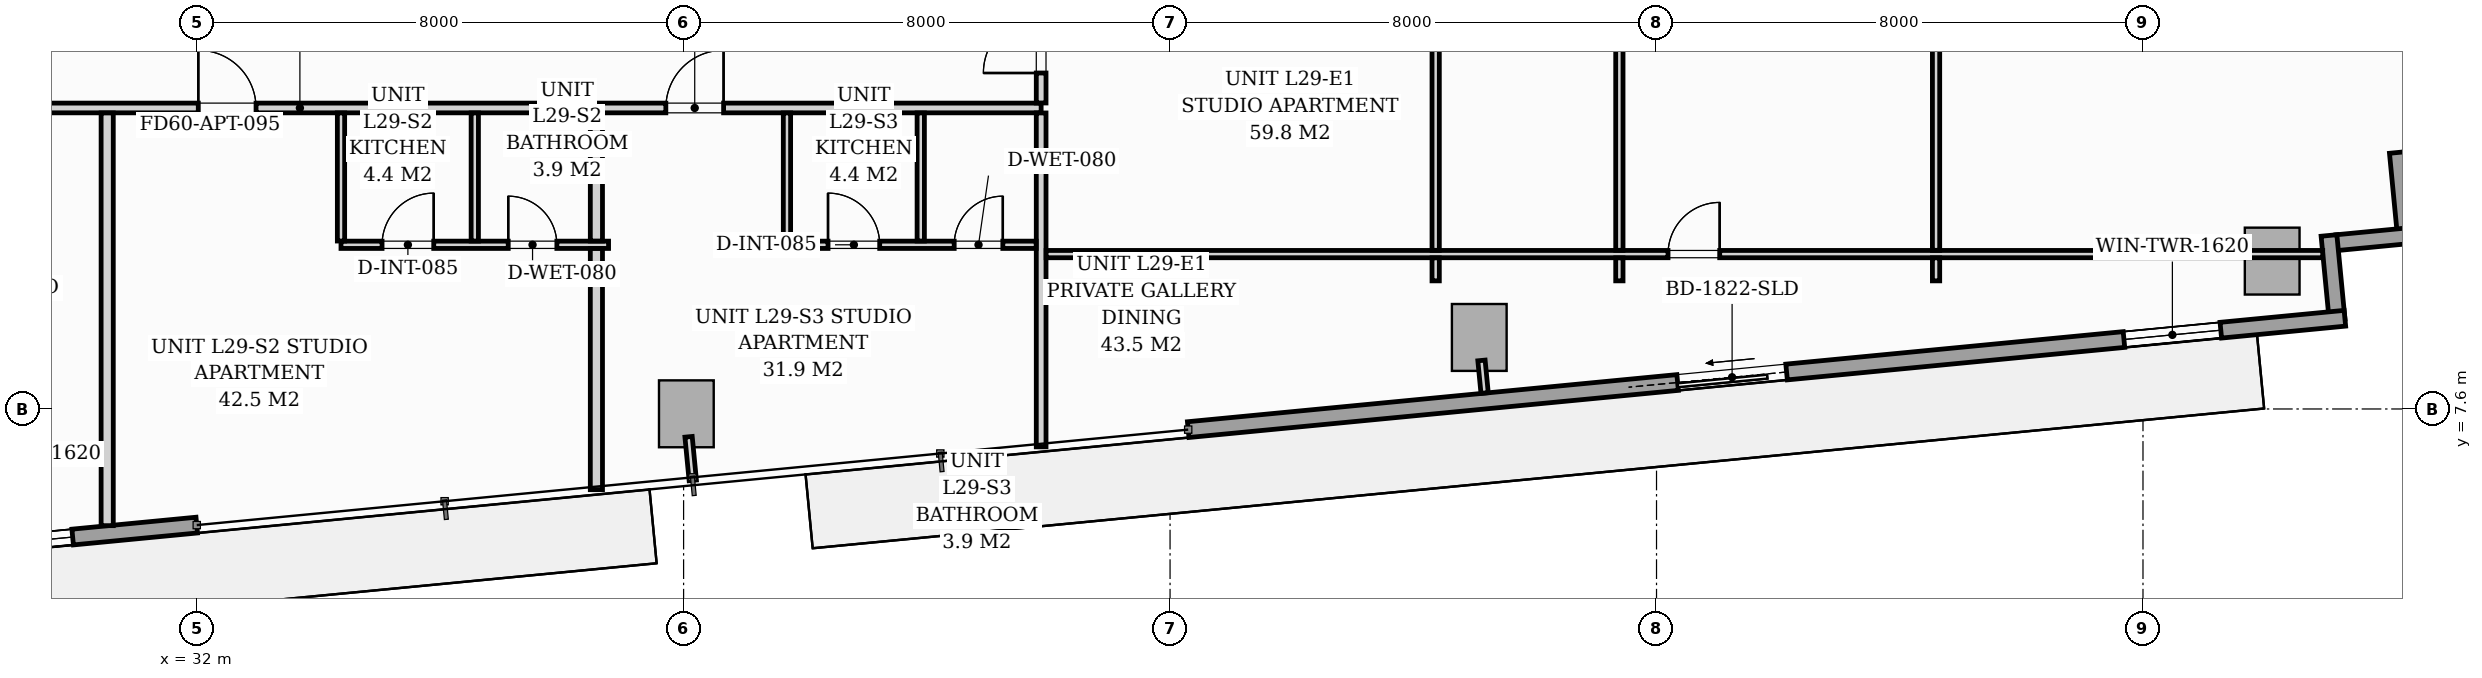
"""IFC4 building model, lengths in metres.
Left out: names, types, materials, properties, quantities, classifications, styles, units other than length and angle.
Written with IfcOpenShell. Run it as: python <this file> out.ifc"""

import sys

from ifc_helpers import new_model, si_unit, direction, frame, frame_2d, origin, origin_2d, place, context, subcontext, project, spatial, rectangle, extrude, source, transform, mapped, element, fill, save


model = new_model("IFC4")
c1 = context("Model", 3, precision=1e-05, world=origin(), true_north=direction((0.0, 1.0)))
c2 = subcontext(c1, "Body", "Model", "MODEL_VIEW")
j1 = project(units=[si_unit("LENGTHUNIT", "METRE"), si_unit("PLANEANGLEUNIT", "RADIAN")], contexts=[c1])
p1 = place(None, origin())
s1 = spatial("IfcSite", under=j1, at=p1, CompositionType="ELEMENT")
p2 = place(p1, origin())
s2 = spatial("IfcBuilding", under=s1, at=p2, CompositionType="ELEMENT")
p3 = place(p2, frame((0.0, 0.0, 103.4)))
s3 = spatial("IfcBuildingStorey", under=s2, at=p3, CompositionType="ELEMENT", Elevation=103.4)
m1 = source(origin(), c2, "Body", "SweptSolid", [
    extrude(rectangle(XDim=0.9, YDim=1.1, at=origin_2d()), origin(), (0.0, 0.0, 1.0), 3.196),
])
for number, where, z_axis, x_axis in (
    (1, (40.045, 7.521, 0.002), (0.0, 0.0, 1.0), (0.995, 0.096, 0.0)),
    (2, (53.085, 8.776, 0.002), (0.0, 0.0, 1.0), (0.995, 0.096, 0.0)),
    (3, (66.125, 10.032, 0.002), (0.0, 0.0, 1.0), (0.995, 0.096, 0.0)),
):
    element("IfcColumn", number, at=place(p3, frame(where, z_axis=z_axis, x_axis=x_axis)), inside=s3, PredefinedType="COLUMN", context=c2, shape_type="MappedRepresentation", body=[
        mapped(m1, transform((0.0, 0.0, 0.0), scale=1.0)),
    ])
p4 = place(p3, frame((68.183, 11.817, 0.0), z_axis=(0.0, 0.0, 1.0), x_axis=(0.095915846097, -0.995389446633, 0.0)))
e4 = element("IfcWall", 4, at=p4, inside=s3, PredefinedType="STANDARD", context=c2, shape_type="SweptSolid", body=[
    extrude(rectangle(XDim=1.395, YDim=0.26, at=frame_2d((0.697, 0.0))), origin(), (0.0, 0.0, 1.0), 2.94),
])
p5 = place(p3, frame((68.574, 10.469, 0.0), z_axis=(0.0, 0.0, 1.0), x_axis=(-0.99540774648, -0.095725744959, 0.0)))
e5 = element("IfcWall", 5, at=p5, inside=s3, PredefinedType="STANDARD", context=c2, shape_type="SweptSolid", body=[
    extrude(rectangle(XDim=1.395, YDim=0.26, at=frame_2d((0.698, 0.0))), origin(), (0.0, 0.0, 1.0), 2.94),
])
p6 = place(p3, frame((67.059, 10.453, 0.0), z_axis=(0.0, 0.0, 1.0), x_axis=(0.095915846097, -0.995389446633, 0.0)))
e6 = element("IfcWall", 6, at=p6, inside=s3, PredefinedType="STANDARD", context=c2, shape_type="SweptSolid", body=[
    extrude(rectangle(XDim=1.395, YDim=0.26, at=frame_2d((0.697, 0.0))), origin(), (0.0, 0.0, 1.0), 2.94),
])
p7 = place(p3, frame((67.32, 9.092, 0.0), z_axis=(0.0, 0.0, 1.0), x_axis=(-0.995396521236, -0.095842399342, 0.0)))
e7 = element("IfcWall", 7, at=p7, inside=s3, PredefinedType="STANDARD", context=c2, shape_type="SweptSolid", body=[
    extrude(rectangle(XDim=19.11, YDim=0.26, at=frame_2d((9.555, 0.0))), origin(), (0.0, 0.0, 1.0), 2.94),
])
p8 = place(p7, frame((9.224, 0.0, 0.0)))
e8 = element("IfcOpeningElement", 8, at=p8, cuts=e7, PredefinedType="OPENING", context=c2, shape_type="SweptSolid", body=[
    extrude(rectangle(XDim=1.8, YDim=2.06, at=frame_2d((0.9, 1.03))), frame((0.0, 0.14, 0.0), z_axis=(0.0, -1.0, 0.0), x_axis=(1.0, 0.0, 0.0)), (0.0, 0.0, 1.0), 0.28),
])
p9 = place(p7, frame((2.05, 0.0, 0.65)))
e9 = element("IfcOpeningElement", 9, at=p9, cuts=e7, PredefinedType="OPENING", context=c2, shape_type="SweptSolid", body=[
    extrude(rectangle(XDim=1.6, YDim=1.5, at=frame_2d((0.8, 0.75))), frame((0.0, 0.14, 0.0), z_axis=(0.0, -1.0, 0.0), x_axis=(1.0, 0.0, 0.0)), (0.0, 0.0, 1.0), 0.28),
])
p10 = place(p3, frame((31.994, 5.69, 0.0), z_axis=(0.0, 0.0, 1.0), x_axis=(-0.995396521236, -0.095842399342, 0.0)))
e10 = element("IfcWall", 10, at=p10, inside=s3, PredefinedType="STANDARD", context=c2, shape_type="SweptSolid", body=[
    extrude(rectangle(XDim=19.11, YDim=0.26, at=frame_2d((9.555, 0.0))), origin(), (0.0, 0.0, 1.0), 2.94),
])
p11 = place(p10, frame((8.33, 0.0, 0.0)))
e11 = element("IfcOpeningElement", 11, at=p11, cuts=e10, PredefinedType="OPENING", context=c2, shape_type="SweptSolid", body=[
    extrude(rectangle(XDim=1.8, YDim=2.06, at=frame_2d((0.9, 1.03))), frame((0.0, 0.14, 0.0), z_axis=(0.0, -1.0, 0.0), x_axis=(1.0, 0.0, 0.0)), (0.0, 0.0, 1.0), 0.28),
])
p12 = place(p10, frame((2.05, 0.0, 0.65)))
e12 = element("IfcOpeningElement", 12, at=p12, cuts=e10, PredefinedType="OPENING", context=c2, shape_type="SweptSolid", body=[
    extrude(rectangle(XDim=1.6, YDim=1.5, at=frame_2d((0.8, 0.75))), frame((0.0, 0.14, 0.0), z_axis=(0.0, -1.0, 0.0), x_axis=(1.0, 0.0, 0.0)), (0.0, 0.0, 1.0), 0.28),
])
p13 = place(p3, frame((21.5, 12.55, 0.0), z_axis=(0.0, 0.0, 1.0), x_axis=(1.0, 0.0, 0.0)))
e13 = element("IfcWall", 13, at=p13, inside=s3, PredefinedType="PARTITIONING", context=c2, shape_type="SweptSolid", body=[
    extrude(rectangle(XDim=24.38, YDim=0.16, at=frame_2d((12.19, 0.0))), origin(), (0.0, 0.0, 1.0), 2.94),
])
p14 = place(p13, frame((6.075, 0.0, 0.0)))
e14 = element("IfcOpeningElement", 14, at=p14, cuts=e13, PredefinedType="OPENING", context=c2, shape_type="SweptSolid", body=[
    extrude(rectangle(XDim=0.95, YDim=2.06, at=frame_2d((0.475, 1.03))), frame((0.0, 0.09, 0.0), z_axis=(0.0, -1.0, 0.0), x_axis=(1.0, 0.0, 0.0)), (0.0, 0.0, 1.0), 0.18),
])
p15 = place(p13, frame((10.519, 0.0, 0.0)))
e15 = element("IfcOpeningElement", 15, at=p15, cuts=e13, PredefinedType="OPENING", context=c2, shape_type="SweptSolid", body=[
    extrude(rectangle(XDim=0.95, YDim=2.06, at=frame_2d((0.475, 1.03))), frame((0.0, 0.09, 0.0), z_axis=(0.0, -1.0, 0.0), x_axis=(1.0, 0.0, 0.0)), (0.0, 0.0, 1.0), 0.18),
])
p16 = place(p13, frame((18.208, 0.0, 0.0)))
e16 = element("IfcOpeningElement", 16, at=p16, cuts=e13, PredefinedType="OPENING", context=c2, shape_type="SweptSolid", body=[
    extrude(rectangle(XDim=0.95, YDim=2.06, at=frame_2d((0.475, 1.03))), frame((0.0, 0.09, 0.0), z_axis=(0.0, -1.0, 0.0), x_axis=(1.0, 0.0, 0.0)), (0.0, 0.0, 1.0), 0.18),
])
p17 = place(p3, frame((45.88, 6.977, 0.0), z_axis=(0.0, 0.0, 1.0), x_axis=(0.0, 1.0, 0.0)))
e17 = element("IfcWall", 17, at=p17, inside=s3, PredefinedType="PARTITIONING", context=c2, shape_type="SweptSolid", body=[
    extrude(rectangle(XDim=5.491, YDim=0.16, at=frame_2d((2.745, 0.0))), origin(), (0.0, 0.0, 1.0), 2.94),
])
p18 = place(p3, frame((45.88, 12.632, 0.0), z_axis=(0.0, 0.0, 1.0), x_axis=(0.0, 1.0, 0.0)))
e18 = element("IfcWall", 18, at=p18, inside=s3, PredefinedType="PARTITIONING", context=c2, shape_type="SweptSolid", body=[
    extrude(rectangle(XDim=4.466, YDim=0.16, at=frame_2d((2.233, 0.0))), origin(), (0.0, 0.0, 1.0), 2.94),
])
p19 = place(p18, frame((0.493, 0.0, 0.0)))
e19 = element("IfcOpeningElement", 19, at=p19, cuts=e18, PredefinedType="OPENING", context=c2, shape_type="SweptSolid", body=[
    extrude(rectangle(XDim=0.95, YDim=2.06, at=frame_2d((0.475, 1.03))), frame((0.0, 0.09, 0.0), z_axis=(0.0, -1.0, 0.0), x_axis=(1.0, 0.0, 0.0)), (0.0, 0.0, 1.0), 0.18),
])
p20 = place(p3, frame((30.521, 5.681, 0.0), z_axis=(0.0, 0.0, 1.0), x_axis=(0.0, 1.0, 0.0)))
e20 = element("IfcWall", 20, at=p20, inside=s3, PredefinedType="PARTITIONING", context=c2, shape_type="SweptSolid", body=[
    extrude(rectangle(XDim=6.787, YDim=0.2, at=frame_2d((3.394, 0.0))), origin(), (0.0, 0.0, 1.0), 2.94),
])
p21 = place(p3, frame((34.366, 10.3, 0.0), z_axis=(0.0, 0.0, 1.0), x_axis=(1.0, 0.0, 0.0)))
e21 = element("IfcWall", 21, at=p21, inside=s3, PredefinedType="PARTITIONING", context=c2, shape_type="SweptSolid", body=[
    extrude(rectangle(XDim=4.4, YDim=0.12, at=frame_2d((2.2, 0.0))), origin(), (0.0, 0.0, 1.0), 2.94),
])
p22 = place(p21, frame((0.675, 0.0, 0.0)))
e22 = element("IfcOpeningElement", 22, at=p22, cuts=e21, PredefinedType="OPENING", context=c2, shape_type="SweptSolid", body=[
    extrude(rectangle(XDim=0.85, YDim=2.05, at=frame_2d((0.425, 1.025))), frame((0.0, 0.07, 0.0), z_axis=(0.0, -1.0, 0.0), x_axis=(1.0, 0.0, 0.0)), (0.0, 0.0, 1.0), 0.14),
])
p23 = place(p21, frame((2.75, 0.0, 0.0)))
e23 = element("IfcOpeningElement", 23, at=p23, cuts=e21, PredefinedType="OPENING", context=c2, shape_type="SweptSolid", body=[
    extrude(rectangle(XDim=0.8, YDim=2.02, at=frame_2d((0.4, 1.01))), frame((0.0, 0.07, 0.0), z_axis=(0.0, -1.0, 0.0), x_axis=(1.0, 0.0, 0.0)), (0.0, 0.0, 1.0), 0.14),
])
for number, where, z_axis, x_axis in (
    (24, (34.366, 10.362, 0.0), (0.0, 0.0, 1.0), (0.0, 1.0, 0.0)),
    (25, (36.566, 10.362, 0.0), (0.0, 0.0, 1.0), (0.0, 1.0, 0.0)),
):
    element("IfcWall", number, at=place(p3, frame(where, z_axis=z_axis, x_axis=x_axis)), inside=s3, PredefinedType="PARTITIONING", context=c2, shape_type="SweptSolid", body=[
        extrude(rectangle(XDim=2.106, YDim=0.12, at=frame_2d((1.053, 0.0))), origin(), (0.0, 0.0, 1.0), 2.94),
    ])
p24 = place(p3, frame((38.566, 6.273, 0.0), z_axis=(0.0, 0.0, 1.0), x_axis=(0.0, 1.0, 0.0)))
e26 = element("IfcWall", 26, at=p24, inside=s3, PredefinedType="PARTITIONING", context=c2, shape_type="SweptSolid", body=[
    extrude(rectangle(XDim=3.965, YDim=0.2, at=frame_2d((1.982, 0.0))), origin(), (0.0, 0.0, 1.0), 2.94),
])
p25 = place(p3, frame((38.566, 10.362, 0.0), z_axis=(0.0, 0.0, 1.0), x_axis=(0.0, 1.0, 0.0)))
e27 = element("IfcWall", 27, at=p25, inside=s3, PredefinedType="PARTITIONING", context=c2, shape_type="SweptSolid", body=[
    extrude(rectangle(XDim=2.106, YDim=0.2, at=frame_2d((1.053, 0.0))), origin(), (0.0, 0.0, 1.0), 2.94),
])
p26 = place(p3, frame((41.7, 10.3, 0.0), z_axis=(0.0, 0.0, 1.0), x_axis=(1.0, 0.0, 0.0)))
e28 = element("IfcWall", 28, at=p26, inside=s3, PredefinedType="PARTITIONING", context=c2, shape_type="SweptSolid", body=[
    extrude(rectangle(XDim=4.098, YDim=0.12, at=frame_2d((2.049, 0.0))), origin(), (0.0, 0.0, 1.0), 2.94),
])
p27 = place(p26, frame((0.675, 0.0, 0.0)))
e29 = element("IfcOpeningElement", 29, at=p27, cuts=e28, PredefinedType="OPENING", context=c2, shape_type="SweptSolid", body=[
    extrude(rectangle(XDim=0.85, YDim=2.05, at=frame_2d((0.425, 1.025))), frame((0.0, 0.07, 0.0), z_axis=(0.0, -1.0, 0.0), x_axis=(1.0, 0.0, 0.0)), (0.0, 0.0, 1.0), 0.14),
])
p28 = place(p26, frame((2.75, 0.0, 0.0)))
e30 = element("IfcOpeningElement", 30, at=p28, cuts=e28, PredefinedType="OPENING", context=c2, shape_type="SweptSolid", body=[
    extrude(rectangle(XDim=0.8, YDim=2.02, at=frame_2d((0.4, 1.01))), frame((0.0, 0.07, 0.0), z_axis=(0.0, -1.0, 0.0), x_axis=(1.0, 0.0, 0.0)), (0.0, 0.0, 1.0), 0.14),
])
for number, where, z_axis, x_axis in (
    (31, (41.7, 10.362, 0.0), (0.0, 0.0, 1.0), (0.0, 1.0, 0.0)),
    (32, (43.9, 10.362, 0.0), (0.0, 0.0, 1.0), (0.0, 1.0, 0.0)),
):
    element("IfcWall", number, at=place(p3, frame(where, z_axis=z_axis, x_axis=x_axis)), inside=s3, PredefinedType="PARTITIONING", context=c2, shape_type="SweptSolid", body=[
        extrude(rectangle(XDim=2.106, YDim=0.12, at=frame_2d((1.053, 0.0))), origin(), (0.0, 0.0, 1.0), 2.94),
    ])
p29 = place(p3, frame((45.962, 10.147, 0.0), z_axis=(0.0, 0.0, 1.0), x_axis=(1.0, 0.0, 0.0)))
e33 = element("IfcWall", 33, at=p29, inside=s3, PredefinedType="PARTITIONING", context=c2, shape_type="SweptSolid", body=[
    extrude(rectangle(XDim=20.994, YDim=0.12, at=frame_2d((10.497, 0.0))), origin(), (0.0, 0.0, 1.0), 2.31),
])
p30 = place(p29, frame((10.227, 0.0, 0.0)))
e34 = element("IfcOpeningElement", 34, at=p30, cuts=e33, PredefinedType="OPENING", context=c2, shape_type="SweptSolid", body=[
    extrude(rectangle(XDim=0.85, YDim=2.05, at=frame_2d((0.425, 1.025))), frame((0.0, 0.07, 0.0), z_axis=(0.0, -1.0, 0.0), x_axis=(1.0, 0.0, 0.0)), (0.0, 0.0, 1.0), 0.14),
])
p31 = place(p3, frame((60.597, 9.707, 0.0), z_axis=(0.0, 0.0, 1.0), x_axis=(0.0, 1.0, 0.0)))
e35 = element("IfcWall", 35, at=p31, inside=s3, PredefinedType="PARTITIONING", context=c2, shape_type="SweptSolid", body=[
    extrude(rectangle(XDim=0.378, YDim=0.12, at=frame_2d((0.189, 0.0))), origin(), (0.0, 0.0, 1.0), 2.94),
])
p32 = place(p3, frame((60.597, 10.209, 0.0), z_axis=(0.0, 0.0, 1.0), x_axis=(0.0, 1.0, 0.0)))
e36 = element("IfcWall", 36, at=p32, inside=s3, PredefinedType="PARTITIONING", context=c2, shape_type="SweptSolid", body=[
    extrude(rectangle(XDim=11.087, YDim=0.12, at=frame_2d((5.543, 0.0))), origin(), (0.0, 0.0, 1.0), 2.94),
])
p33 = place(p32, frame((5.118, 0.0, 0.0)))
e37 = element("IfcOpeningElement", 37, at=p33, cuts=e36, PredefinedType="OPENING", context=c2, shape_type="SweptSolid", body=[
    extrude(rectangle(XDim=0.85, YDim=2.05, at=frame_2d((0.425, 1.025))), frame((0.0, 0.07, 0.0), z_axis=(0.0, -1.0, 0.0), x_axis=(1.0, 0.0, 0.0)), (0.0, 0.0, 1.0), 0.14),
])
p34 = place(p3, frame((55.389, 9.707, 0.0), z_axis=(0.0, 0.0, 1.0), x_axis=(0.0, 1.0, 0.0)))
e38 = element("IfcWall", 38, at=p34, inside=s3, PredefinedType="PARTITIONING", context=c2, shape_type="SweptSolid", body=[
    extrude(rectangle(XDim=0.378, YDim=0.12, at=frame_2d((0.189, 0.0))), origin(), (0.0, 0.0, 1.0), 2.94),
])
p35 = place(p3, frame((55.389, 10.209, 0.0), z_axis=(0.0, 0.0, 1.0), x_axis=(0.0, 1.0, 0.0)))
e39 = element("IfcWall", 39, at=p35, inside=s3, PredefinedType="PARTITIONING", context=c2, shape_type="SweptSolid", body=[
    extrude(rectangle(XDim=11.087, YDim=0.12, at=frame_2d((5.543, 0.0))), origin(), (0.0, 0.0, 1.0), 2.94),
])
p36 = place(p35, frame((5.118, 0.0, 0.0)))
e40 = element("IfcOpeningElement", 40, at=p36, cuts=e39, PredefinedType="OPENING", context=c2, shape_type="SweptSolid", body=[
    extrude(rectangle(XDim=0.85, YDim=2.05, at=frame_2d((0.425, 1.025))), frame((0.0, 0.07, 0.0), z_axis=(0.0, -1.0, 0.0), x_axis=(1.0, 0.0, 0.0)), (0.0, 0.0, 1.0), 0.14),
])
p37 = place(p3, frame((52.368, 9.707, 0.0), z_axis=(0.0, 0.0, 1.0), x_axis=(0.0, 1.0, 0.0)))
e41 = element("IfcWall", 41, at=p37, inside=s3, PredefinedType="PARTITIONING", context=c2, shape_type="SweptSolid", body=[
    extrude(rectangle(XDim=0.378, YDim=0.12, at=frame_2d((0.189, 0.0))), origin(), (0.0, 0.0, 1.0), 2.94),
])
p38 = place(p3, frame((52.368, 10.209, 0.0), z_axis=(0.0, 0.0, 1.0), x_axis=(0.0, 1.0, 0.0)))
e42 = element("IfcWall", 42, at=p38, inside=s3, PredefinedType="PARTITIONING", context=c2, shape_type="SweptSolid", body=[
    extrude(rectangle(XDim=11.087, YDim=0.12, at=frame_2d((5.543, 0.0))), origin(), (0.0, 0.0, 1.0), 2.94),
])
p39 = place(p38, frame((5.118, 0.0, 0.0)))
e43 = element("IfcOpeningElement", 43, at=p39, cuts=e42, PredefinedType="OPENING", context=c2, shape_type="SweptSolid", body=[
    extrude(rectangle(XDim=0.85, YDim=2.05, at=frame_2d((0.425, 1.025))), frame((0.0, 0.07, 0.0), z_axis=(0.0, -1.0, 0.0), x_axis=(1.0, 0.0, 0.0)), (0.0, 0.0, 1.0), 0.14),
])
p40 = place(p3, frame((40.082, 7.142, 0.0), z_axis=(0.0, 0.0, 1.0), x_axis=(0.095944965663, -0.995386640238, 0.0)))
e44 = element("IfcWall", 44, at=p40, inside=s3, PredefinedType="PARTITIONING", context=c2, shape_type="SweptSolid", body=[
    extrude(rectangle(XDim=0.72, YDim=0.12, at=frame_2d((0.36, 0.0))), origin(), (0.0, 0.0, 1.0), 2.94),
])
p41 = place(p3, frame((53.121, 8.398, 0.0), z_axis=(0.0, 0.0, 1.0), x_axis=(0.096179204763, -0.995364034196, 0.0)))
e45 = element("IfcWall", 45, at=p41, inside=s3, PredefinedType="PARTITIONING", context=c2, shape_type="SweptSolid", body=[
    extrude(rectangle(XDim=0.538, YDim=0.12, at=frame_2d((0.269, 0.0))), origin(), (0.0, 0.0, 1.0), 2.94),
])
m2 = source(origin(), c2, "Body", "SweptSolid", [
    extrude(rectangle(XDim=1.6, YDim=1.5, at=frame_2d((0.8, 0.75))), frame((0.0, 0.03, 0.0), z_axis=(0.0, -1.0, 0.0), x_axis=(1.0, 0.0, 0.0)), (0.0, 0.0, 1.0), 0.06),
])
p42 = place(p12, origin())
e46 = element("IfcWindow", 46, at=p42, inside=s3, PartitioningType="SINGLE_PANEL", PredefinedType="WINDOW", context=c2, shape_type="MappedRepresentation", body=[
    mapped(m2, transform((0.0, 0.0, 0.0), scale=1.0)),
])
fill(e12, e46)
m3 = source(origin(), c2, "Body", "SweptSolid", [
    extrude(rectangle(XDim=1.8, YDim=2.06, at=frame_2d((0.9, 1.03))), frame((0.0, 0.025, 0.0), z_axis=(0.0, -1.0, 0.0), x_axis=(1.0, 0.0, 0.0)), (0.0, 0.0, 1.0), 0.05),
])
p43 = place(p8, origin())
e47 = element("IfcDoor", 47, at=p43, inside=s3, OperationType="SLIDING_TO_RIGHT", PredefinedType="DOOR", context=c2, shape_type="MappedRepresentation", body=[
    mapped(m3, transform((0.0, 0.0, 0.0), scale=1.0)),
])
fill(e8, e47)
p44 = place(p9, origin())
e48 = element("IfcWindow", 48, at=p44, inside=s3, PartitioningType="SINGLE_PANEL", PredefinedType="WINDOW", context=c2, shape_type="MappedRepresentation", body=[
    mapped(m2, transform((0.0, 0.0, 0.0), scale=1.0)),
])
fill(e9, e48)
m4 = source(origin(), c2, "Body", "SweptSolid", [
    extrude(rectangle(XDim=0.95, YDim=2.06, at=frame_2d((0.475, 1.03))), frame((0.0, 0.025, 0.0), z_axis=(0.0, -1.0, 0.0), x_axis=(1.0, 0.0, 0.0)), (0.0, 0.0, 1.0), 0.05),
])
p45 = place(p15, origin())
e49 = element("IfcDoor", 49, at=p45, inside=s3, OperationType="SINGLE_SWING_LEFT", PredefinedType="DOOR", context=c2, shape_type="MappedRepresentation", body=[
    mapped(m4, transform((0.0, 0.0, 0.0), scale=1.0)),
])
fill(e15, e49)
m5 = source(origin(), c2, "Body", "SweptSolid", [
    extrude(rectangle(XDim=0.85, YDim=2.05, at=frame_2d((0.425, 1.025))), frame((0.0, 0.025, 0.0), z_axis=(0.0, -1.0, 0.0), x_axis=(1.0, 0.0, 0.0)), (0.0, 0.0, 1.0), 0.05),
])
p46 = place(p22, origin())
e50 = element("IfcDoor", 50, at=p46, inside=s3, OperationType="SINGLE_SWING_RIGHT", PredefinedType="DOOR", context=c2, shape_type="MappedRepresentation", body=[
    mapped(m5, transform((0.0, 0.0, 0.0), scale=1.0)),
])
fill(e22, e50)
m6 = source(origin(), c2, "Body", "SweptSolid", [
    extrude(rectangle(XDim=0.8, YDim=2.02, at=frame_2d((0.4, 1.01))), frame((0.0, 0.025, 0.0), z_axis=(0.0, -1.0, 0.0), x_axis=(1.0, 0.0, 0.0)), (0.0, 0.0, 1.0), 0.05),
])
p47 = place(p23, origin())
e51 = element("IfcDoor", 51, at=p47, inside=s3, OperationType="SINGLE_SWING_LEFT", PredefinedType="DOOR", context=c2, shape_type="MappedRepresentation", body=[
    mapped(m6, transform((0.0, 0.0, 0.0), scale=1.0)),
])
fill(e23, e51)
p48 = place(p16, origin())
e52 = element("IfcDoor", 52, at=p48, inside=s3, OperationType="SINGLE_SWING_RIGHT", PredefinedType="DOOR", context=c2, shape_type="MappedRepresentation", body=[
    mapped(m4, transform((0.0, 0.0, 0.0), scale=1.0)),
])
fill(e16, e52)
p49 = place(p27, origin())
e53 = element("IfcDoor", 53, at=p49, inside=s3, OperationType="SINGLE_SWING_LEFT", PredefinedType="DOOR", context=c2, shape_type="MappedRepresentation", body=[
    mapped(m5, transform((0.0, 0.0, 0.0), scale=1.0)),
])
fill(e29, e53)
p50 = place(p28, origin())
e54 = element("IfcDoor", 54, at=p50, inside=s3, OperationType="SINGLE_SWING_RIGHT", PredefinedType="DOOR", context=c2, shape_type="MappedRepresentation", body=[
    mapped(m6, transform((0.0, 0.0, 0.0), scale=1.0)),
])
fill(e30, e54)
p51 = place(p19, origin())
e55 = element("IfcDoor", 55, at=p51, inside=s3, OperationType="SINGLE_SWING_LEFT", PredefinedType="DOOR", context=c2, shape_type="MappedRepresentation", body=[
    mapped(m4, transform((0.0, 0.0, 0.0), scale=1.0)),
])
fill(e19, e55)
p52 = place(p30, origin())
e56 = element("IfcDoor", 56, at=p52, inside=s3, OperationType="SINGLE_SWING_RIGHT", PredefinedType="DOOR", context=c2, shape_type="MappedRepresentation", body=[
    mapped(m5, transform((0.0, 0.0, 0.0), scale=1.0)),
])
fill(e34, e56)
save(model, sys.argv[1])
